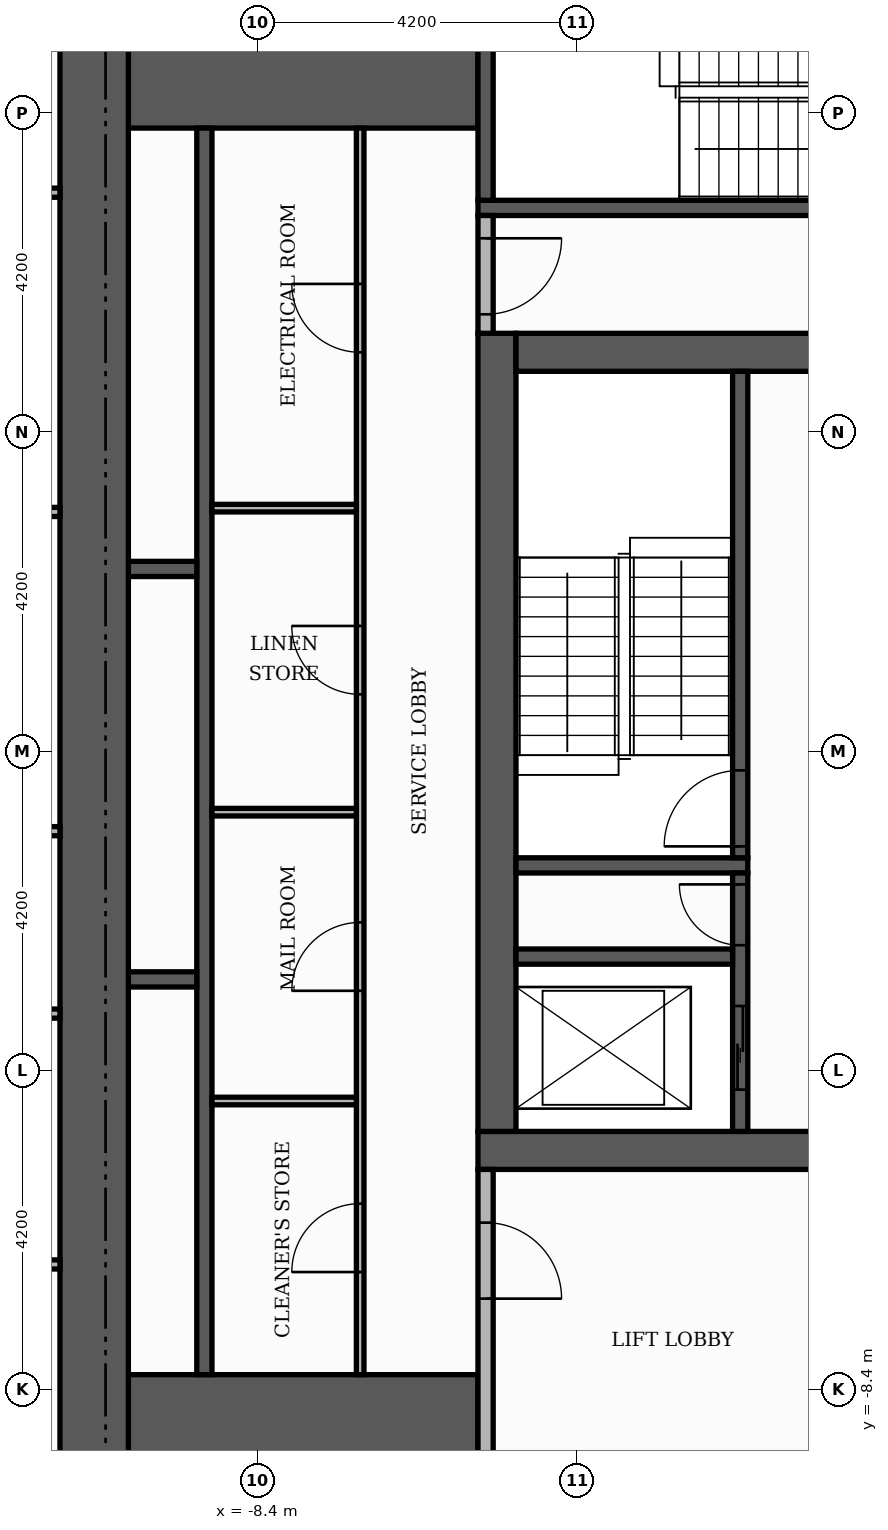
"""IFC4 building model, lengths in metres.
Left out: names, types, materials, properties, quantities, classifications, styles, units other than length and angle.
Written with IfcOpenShell. Run it as: python <this file> out.ifc"""

import sys

from ifc_helpers import new_model, si_unit, direction, frame, frame_2d, origin, place, context, subcontext, project, spatial, rectangle, extrude, element, fill, save


model = new_model("IFC4")
c1 = context("Model", 3, precision=1e-05, world=origin(), true_north=direction((0.0, 1.0)))
c2 = subcontext(c1, "Body", "Model", "MODEL_VIEW")
j1 = project(units=[si_unit("LENGTHUNIT", "METRE"), si_unit("PLANEANGLEUNIT", "RADIAN")], contexts=[c1])
p1 = place(None, origin())
s1 = spatial("IfcSite", under=j1, at=p1, CompositionType="ELEMENT")
p2 = place(p1, origin())
s2 = spatial("IfcBuilding", under=s1, at=p2, CompositionType="ELEMENT")
p3 = place(p2, frame((0.0, 0.0, 260.1)))
s3 = spatial("IfcBuildingStorey", under=s2, at=p3, CompositionType="ELEMENT", Elevation=260.1)
p4 = place(p3, frame((-5.5, -5.25, 0.0), z_axis=(0.0, 0.0, 1.0), x_axis=(1.0, 0.0, 0.0)))
e1 = element("IfcWall", 1, at=p4, inside=s3, PredefinedType="SHEAR", context=c2, shape_type="SweptSolid", body=[
    extrude(rectangle(XDim=11.0, YDim=0.5, at=frame_2d((5.5, 0.0))), origin(), (0.0, 0.0, 1.0), 3.48),
])
p5 = place(p4, frame((4.9, 0.0, 0.0)))
e2 = element("IfcOpeningElement", 2, at=p5, cuts=e1, PredefinedType="OPENING", context=c2, shape_type="SweptSolid", body=[
    extrude(rectangle(XDim=1.2, YDim=2.1, at=frame_2d((0.6, 1.05))), frame((0.0, 0.26, 0.0), z_axis=(0.0, -1.0, 0.0), x_axis=(1.0, 0.0, 0.0)), (0.0, 0.0, 1.0), 0.52),
])
p6 = place(p3, frame((-5.25, -5.0, 0.0), z_axis=(0.0, 0.0, 1.0), x_axis=(0.0, 1.0, 0.0)))
e3 = element("IfcWall", 3, at=p6, inside=s3, PredefinedType="SHEAR", context=c2, shape_type="SweptSolid", body=[
    extrude(rectangle(XDim=10.5, YDim=0.5, at=frame_2d((5.25, 0.0))), origin(), (0.0, 0.0, 1.0), 3.48),
])
p7 = place(p3, frame((-5.0, 5.25, 0.0), z_axis=(0.0, 0.0, 1.0), x_axis=(1.0, 0.0, 0.0)))
e4 = element("IfcWall", 4, at=p7, inside=s3, PredefinedType="SHEAR", context=c2, shape_type="SweptSolid", body=[
    extrude(rectangle(XDim=10.0, YDim=0.5, at=frame_2d((5.0, 0.0))), origin(), (0.0, 0.0, 1.0), 3.48),
])
p8 = place(p7, frame((4.4, 0.0, 0.0)))
e5 = element("IfcOpeningElement", 5, at=p8, cuts=e4, PredefinedType="OPENING", context=c2, shape_type="SweptSolid", body=[
    extrude(rectangle(XDim=1.2, YDim=2.1, at=frame_2d((0.6, 1.05))), frame((0.0, 0.26, 0.0), z_axis=(0.0, -1.0, 0.0), x_axis=(1.0, 0.0, 0.0)), (0.0, 0.0, 1.0), 0.52),
])
for number, where, z_axis, x_axis in (
    (6, (-10.1, -9.15, 0.0), (0.0, 0.0, 1.0), (1.0, 0.0, 0.0)),
    (7, (-10.1, 9.15, 0.0), (0.0, 0.0, 1.0), (1.0, 0.0, 0.0)),
):
    element("IfcWall", number, at=place(p3, frame(where, z_axis=z_axis, x_axis=x_axis)), inside=s3, PredefinedType="SHEAR", context=c2, shape_type="SweptSolid", body=[
        extrude(rectangle(XDim=4.6, YDim=1.9, at=frame_2d((2.3, 0.0))), origin(), (0.0, 0.0, 1.0), 3.48),
    ])
p9 = place(p3, frame((-5.0, -1.5, 0.0), z_axis=(0.0, 0.0, 1.0), x_axis=(1.0, 0.0, 0.0)))
e8 = element("IfcWall", 8, at=p9, inside=s3, PredefinedType="SHEAR", context=c2, shape_type="SweptSolid", body=[
    extrude(rectangle(XDim=3.05, YDim=0.2, at=frame_2d((1.525, 0.0))), origin(), (0.0, 0.0, 1.0), 3.48),
])
p10 = place(p3, frame((-2.05, -1.4, 0.0), z_axis=(0.0, 0.0, 1.0), x_axis=(0.0, 1.0, 0.0)))
e9 = element("IfcWall", 9, at=p10, inside=s3, PredefinedType="SHEAR", context=c2, shape_type="SweptSolid", body=[
    extrude(rectangle(XDim=6.4, YDim=0.2, at=frame_2d((3.2, 0.0))), origin(), (0.0, 0.0, 1.0), 3.48),
])
p11 = place(p10, frame((0.15, 0.0, 0.0)))
e10 = element("IfcOpeningElement", 10, at=p11, cuts=e9, PredefinedType="OPENING", context=c2, shape_type="SweptSolid", body=[
    extrude(rectangle(XDim=1.0, YDim=2.1, at=frame_2d((0.5, 1.05))), frame((0.0, 0.11, 0.0), z_axis=(0.0, -1.0, 0.0), x_axis=(1.0, 0.0, 0.0)), (0.0, 0.0, 1.0), 0.22),
])
p12 = place(p3, frame((-5.5, 7.15, 0.0), z_axis=(0.0, 0.0, 1.0), x_axis=(1.0, 0.0, 0.0)))
e11 = element("IfcWall", 11, at=p12, inside=s3, PredefinedType="SHEAR", context=c2, shape_type="SweptSolid", body=[
    extrude(rectangle(XDim=6.8, YDim=0.2, at=frame_2d((3.4, 0.0))), origin(), (0.0, 0.0, 1.0), 3.48),
])
p13 = place(p3, frame((-5.4, 7.25, 0.0), z_axis=(0.0, 0.0, 1.0), x_axis=(0.0, 1.0, 0.0)))
e12 = element("IfcWall", 12, at=p13, inside=s3, PredefinedType="SHEAR", context=c2, shape_type="SweptSolid", body=[
    extrude(rectangle(XDim=2.85, YDim=0.2, at=frame_2d((1.425, 0.0))), origin(), (0.0, 0.0, 1.0), 3.48),
])
p14 = place(p3, frame((-9.1, -8.2, 0.0), z_axis=(0.0, 0.0, 1.0), x_axis=(0.0, 1.0, 0.0)))
e13 = element("IfcWall", 13, at=p14, inside=s3, PredefinedType="SHEAR", context=c2, shape_type="SweptSolid", body=[
    extrude(rectangle(XDim=16.4, YDim=0.2, at=frame_2d((8.2, 0.0))), origin(), (0.0, 0.0, 1.0), 3.48),
])
p15 = place(p3, frame((-2.05, -5.0, 0.0), z_axis=(0.0, 0.0, 1.0), x_axis=(0.0, 1.0, 0.0)))
e14 = element("IfcWall", 14, at=p15, inside=s3, PredefinedType="SHEAR", context=c2, shape_type="SweptSolid", body=[
    extrude(rectangle(XDim=3.4, YDim=0.2, at=frame_2d((1.7, 0.0))), origin(), (0.0, 0.0, 1.0), 3.48),
])
p16 = place(p15, frame((0.55, 0.0, 0.0)))
e15 = element("IfcOpeningElement", 15, at=p16, cuts=e14, PredefinedType="OPENING", context=c2, shape_type="SweptSolid", body=[
    extrude(rectangle(XDim=1.1, YDim=2.1, at=frame_2d((0.55, 1.05))), frame((0.0, 0.11, 0.0), z_axis=(0.0, -1.0, 0.0), x_axis=(1.0, 0.0, 0.0)), (0.0, 0.0, 1.0), 0.22),
])
p17 = place(p15, frame((2.45, 0.0, 0.0)))
e16 = element("IfcOpeningElement", 16, at=p17, cuts=e14, PredefinedType="OPENING", context=c2, shape_type="SweptSolid", body=[
    extrude(rectangle(XDim=0.8, YDim=2.1, at=frame_2d((0.4, 1.05))), frame((0.0, 0.11, 0.0), z_axis=(0.0, -1.0, 0.0), x_axis=(1.0, 0.0, 0.0)), (0.0, 0.0, 1.0), 0.22),
])
p18 = place(p3, frame((-10.1, -3.0, 0.0), z_axis=(0.0, 0.0, 1.0), x_axis=(1.0, 0.0, 0.0)))
e17 = element("IfcWall", 17, at=p18, inside=s3, PredefinedType="SHEAR", context=c2, shape_type="SweptSolid", body=[
    extrude(rectangle(XDim=0.9, YDim=0.2, at=frame_2d((0.45, 0.0))), origin(), (0.0, 0.0, 1.0), 3.48),
])
p19 = place(p3, frame((-5.0, -2.7, 0.0), z_axis=(0.0, 0.0, 1.0), x_axis=(1.0, 0.0, 0.0)))
e18 = element("IfcWall", 18, at=p19, inside=s3, PredefinedType="SHEAR", context=c2, shape_type="SweptSolid", body=[
    extrude(rectangle(XDim=2.85, YDim=0.2, at=frame_2d((1.425, 0.0))), origin(), (0.0, 0.0, 1.0), 3.48),
])
p20 = place(p3, frame((-10.1, 2.4, 0.0), z_axis=(0.0, 0.0, 1.0), x_axis=(1.0, 0.0, 0.0)))
e19 = element("IfcWall", 19, at=p20, inside=s3, PredefinedType="SHEAR", context=c2, shape_type="SweptSolid", body=[
    extrude(rectangle(XDim=0.9, YDim=0.2, at=frame_2d((0.45, 0.0))), origin(), (0.0, 0.0, 1.0), 3.48),
])
p21 = place(p3, frame((-10.55, -10.1, 0.0), z_axis=(0.0, 0.0, 1.0), x_axis=(0.0, 1.0, 0.0)))
e20 = element("IfcWall", 20, at=p21, inside=s3, PredefinedType="SHEAR", context=c2, shape_type="SweptSolid", body=[
    extrude(rectangle(XDim=20.2, YDim=0.9, at=frame_2d((10.1, 0.0))), origin(), (0.0, 0.0, 1.0), 3.48),
])
p22 = place(p3, frame((-5.4, -10.1, 0.0), z_axis=(0.0, 0.0, 1.0), x_axis=(0.0, 1.0, 0.0)))
e21 = element("IfcWall", 21, at=p22, inside=s3, PredefinedType="PARTITIONING", context=c2, shape_type="SweptSolid", body=[
    extrude(rectangle(XDim=4.6, YDim=0.2, at=frame_2d((2.3, 0.0))), origin(), (0.0, 0.0, 1.0), 3.48),
])
p23 = place(p22, frame((2.9, 0.0, 0.0)))
e22 = element("IfcOpeningElement", 22, at=p23, cuts=e21, PredefinedType="OPENING", context=c2, shape_type="SweptSolid", body=[
    extrude(rectangle(XDim=1.0, YDim=2.1, at=frame_2d((0.5, 1.05))), frame((0.0, 0.11, 0.0), z_axis=(0.0, -1.0, 0.0), x_axis=(1.0, 0.0, 0.0)), (0.0, 0.0, 1.0), 0.22),
])
p24 = place(p3, frame((-7.05, -8.2, 0.0), z_axis=(0.0, 0.0, 1.0), x_axis=(0.0, 1.0, 0.0)))
e23 = element("IfcWall", 23, at=p24, inside=s3, PredefinedType="PARTITIONING", context=c2, shape_type="SweptSolid", body=[
    extrude(rectangle(XDim=16.4, YDim=0.1, at=frame_2d((8.2, 0.0))), origin(), (0.0, 0.0, 1.0), 3.48),
])
p25 = place(p24, frame((1.35, 0.0, 0.0)))
e24 = element("IfcOpeningElement", 24, at=p25, cuts=e23, PredefinedType="OPENING", context=c2, shape_type="SweptSolid", body=[
    extrude(rectangle(XDim=0.9, YDim=2.1, at=frame_2d((0.45, 1.05))), frame((0.0, 0.06, 0.0), z_axis=(0.0, -1.0, 0.0), x_axis=(1.0, 0.0, 0.0)), (0.0, 0.0, 1.0), 0.12),
])
p26 = place(p24, frame((5.05, 0.0, 0.0)))
e25 = element("IfcOpeningElement", 25, at=p26, cuts=e23, PredefinedType="OPENING", context=c2, shape_type="SweptSolid", body=[
    extrude(rectangle(XDim=0.9, YDim=2.1, at=frame_2d((0.45, 1.05))), frame((0.0, 0.06, 0.0), z_axis=(0.0, -1.0, 0.0), x_axis=(1.0, 0.0, 0.0)), (0.0, 0.0, 1.0), 0.12),
])
p27 = place(p24, frame((8.95, 0.0, 0.0)))
e26 = element("IfcOpeningElement", 26, at=p27, cuts=e23, PredefinedType="OPENING", context=c2, shape_type="SweptSolid", body=[
    extrude(rectangle(XDim=0.9, YDim=2.1, at=frame_2d((0.45, 1.05))), frame((0.0, 0.06, 0.0), z_axis=(0.0, -1.0, 0.0), x_axis=(1.0, 0.0, 0.0)), (0.0, 0.0, 1.0), 0.12),
])
p28 = place(p24, frame((13.45, 0.0, 0.0)))
e27 = element("IfcOpeningElement", 27, at=p28, cuts=e23, PredefinedType="OPENING", context=c2, shape_type="SweptSolid", body=[
    extrude(rectangle(XDim=0.9, YDim=2.1, at=frame_2d((0.45, 1.05))), frame((0.0, 0.06, 0.0), z_axis=(0.0, -1.0, 0.0), x_axis=(1.0, 0.0, 0.0)), (0.0, 0.0, 1.0), 0.12),
])
for number, where, z_axis, x_axis in (
    (28, (-9.0, -4.6, 0.0), (0.0, 0.0, 1.0), (1.0, 0.0, 0.0)),
    (29, (-9.0, -0.8, 0.0), (0.0, 0.0, 1.0), (1.0, 0.0, 0.0)),
    (30, (-9.0, 3.2, 0.0), (0.0, 0.0, 1.0), (1.0, 0.0, 0.0)),
):
    element("IfcWall", number, at=place(p3, frame(where, z_axis=z_axis, x_axis=x_axis)), inside=s3, PredefinedType="PARTITIONING", context=c2, shape_type="SweptSolid", body=[
        extrude(rectangle(XDim=1.9, YDim=0.1, at=frame_2d((0.95, 0.0))), origin(), (0.0, 0.0, 1.0), 3.48),
    ])
p29 = place(p3, frame((-5.4, 5.5, 0.0), z_axis=(0.0, 0.0, 1.0), x_axis=(0.0, 1.0, 0.0)))
e31 = element("IfcWall", 31, at=p29, inside=s3, PredefinedType="PARTITIONING", context=c2, shape_type="SweptSolid", body=[
    extrude(rectangle(XDim=1.55, YDim=0.2, at=frame_2d((0.775, 0.0))), origin(), (0.0, 0.0, 1.0), 3.48),
])
p30 = place(p29, frame((0.25, 0.0, 0.0)))
e32 = element("IfcOpeningElement", 32, at=p30, cuts=e31, PredefinedType="OPENING", context=c2, shape_type="SweptSolid", body=[
    extrude(rectangle(XDim=1.0, YDim=2.1, at=frame_2d((0.5, 1.05))), frame((0.0, 0.11, 0.0), z_axis=(0.0, -1.0, 0.0), x_axis=(1.0, 0.0, 0.0)), (0.0, 0.0, 1.0), 0.22),
])
for number, where, z_axis, x_axis in (
    (33, (-19.22, -6.75, 0.0), (0.0, 0.0, 1.0), (1.0, 0.0, 0.0)),
    (34, (-19.22, -3.45, 0.0), (0.0, 0.0, 1.0), (1.0, 0.0, 0.0)),
    (35, (-19.22, -1.05, 0.0), (0.0, 0.0, 1.0), (1.0, 0.0, 0.0)),
    (36, (-19.22, 3.15, 0.0), (0.0, 0.0, 1.0), (1.0, 0.0, 0.0)),
):
    element("IfcWall", number, at=place(p3, frame(where, z_axis=z_axis, x_axis=x_axis)), inside=s3, PredefinedType="PARTITIONING", context=c2, shape_type="SweptSolid", body=[
        extrude(rectangle(XDim=8.22, YDim=0.12, at=frame_2d((4.11, 0.0))), origin(), (0.0, 0.0, 1.0), 3.48),
    ])
p31 = place(p3, frame((-19.22, 7.35, 0.0), z_axis=(0.0, 0.0, 1.0), x_axis=(1.0, 0.0, 0.0)))
e37 = element("IfcWall", 37, at=p31, inside=s3, PredefinedType="PARTITIONING", context=c2, shape_type="SweptSolid", body=[
    extrude(rectangle(XDim=8.22, YDim=0.12, at=frame_2d((4.11, 0.0))), origin(), (0.0, 0.0, 1.0), 3.48),
])
p32 = place(p31, frame((3.66, 0.0, 0.0)))
e38 = element("IfcOpeningElement", 38, at=p32, cuts=e37, PredefinedType="OPENING", context=c2, shape_type="SweptSolid", body=[
    extrude(rectangle(XDim=0.9, YDim=2.1, at=frame_2d((0.45, 1.05))), frame((0.0, 0.07, 0.0), z_axis=(0.0, -1.0, 0.0), x_axis=(1.0, 0.0, 0.0)), (0.0, 0.0, 1.0), 0.14),
])
p33 = place(p16, origin())
e39 = element("IfcDoor", 39, at=p33, inside=s3, OperationType="SLIDING_TO_LEFT", PredefinedType="DOOR", context=c2, shape_type="SweptSolid", body=[
    extrude(rectangle(XDim=1.1, YDim=2.1, at=frame_2d((0.55, 1.05))), frame((0.0, 0.025, 0.0), z_axis=(0.0, -1.0, 0.0), x_axis=(1.0, 0.0, 0.0)), (0.0, 0.0, 1.0), 0.05),
])
fill(e15, e39)
p34 = place(p11, origin())
e40 = element("IfcDoor", 40, at=p34, inside=s3, OperationType="SINGLE_SWING_LEFT", PredefinedType="DOOR", context=c2, shape_type="SweptSolid", body=[
    extrude(rectangle(XDim=1.0, YDim=2.1, at=frame_2d((0.5, 1.05))), frame((0.0, 0.025, 0.0), z_axis=(0.0, -1.0, 0.0), x_axis=(1.0, 0.0, 0.0)), (0.0, 0.0, 1.0), 0.05),
])
fill(e10, e40)
p35 = place(p17, origin())
e41 = element("IfcDoor", 41, at=p35, inside=s3, OperationType="SINGLE_SWING_RIGHT", PredefinedType="DOOR", context=c2, shape_type="SweptSolid", body=[
    extrude(rectangle(XDim=0.8, YDim=2.1, at=frame_2d((0.4, 1.05))), frame((0.0, 0.025, 0.0), z_axis=(0.0, -1.0, 0.0), x_axis=(1.0, 0.0, 0.0)), (0.0, 0.0, 1.0), 0.05),
])
fill(e16, e41)
p36 = place(p30, frame((1.0, 0.0, 0.0), z_axis=(0.0, 0.0, 1.0), x_axis=(-1.0, 0.0, 0.0)))
e42 = element("IfcDoor", 42, at=p36, inside=s3, OperationType="SINGLE_SWING_RIGHT", PredefinedType="DOOR", context=c2, shape_type="SweptSolid", body=[
    extrude(rectangle(XDim=1.0, YDim=2.1, at=frame_2d((0.5, 1.05))), frame((0.0, 0.025, 0.0), z_axis=(0.0, -1.0, 0.0), x_axis=(1.0, 0.0, 0.0)), (0.0, 0.0, 1.0), 0.05),
])
fill(e32, e42)
p37 = place(p23, frame((1.0, 0.0, 0.0), z_axis=(0.0, 0.0, 1.0), x_axis=(-1.0, 0.0, 0.0)))
e43 = element("IfcDoor", 43, at=p37, inside=s3, OperationType="SINGLE_SWING_LEFT", PredefinedType="DOOR", context=c2, shape_type="SweptSolid", body=[
    extrude(rectangle(XDim=1.0, YDim=2.1, at=frame_2d((0.5, 1.05))), frame((0.0, 0.025, 0.0), z_axis=(0.0, -1.0, 0.0), x_axis=(1.0, 0.0, 0.0)), (0.0, 0.0, 1.0), 0.05),
])
fill(e22, e43)
p38 = place(p25, origin())
e44 = element("IfcDoor", 44, at=p38, inside=s3, OperationType="SINGLE_SWING_LEFT", PredefinedType="DOOR", context=c2, shape_type="SweptSolid", body=[
    extrude(rectangle(XDim=0.9, YDim=2.1, at=frame_2d((0.45, 1.05))), frame((0.0, 0.025, 0.0), z_axis=(0.0, -1.0, 0.0), x_axis=(1.0, 0.0, 0.0)), (0.0, 0.0, 1.0), 0.05),
])
fill(e24, e44)
p39 = place(p26, origin())
e45 = element("IfcDoor", 45, at=p39, inside=s3, OperationType="SINGLE_SWING_LEFT", PredefinedType="DOOR", context=c2, shape_type="SweptSolid", body=[
    extrude(rectangle(XDim=0.9, YDim=2.1, at=frame_2d((0.45, 1.05))), frame((0.0, 0.025, 0.0), z_axis=(0.0, -1.0, 0.0), x_axis=(1.0, 0.0, 0.0)), (0.0, 0.0, 1.0), 0.05),
])
fill(e25, e45)
p40 = place(p27, origin())
e46 = element("IfcDoor", 46, at=p40, inside=s3, OperationType="SINGLE_SWING_RIGHT", PredefinedType="DOOR", context=c2, shape_type="SweptSolid", body=[
    extrude(rectangle(XDim=0.9, YDim=2.1, at=frame_2d((0.45, 1.05))), frame((0.0, 0.025, 0.0), z_axis=(0.0, -1.0, 0.0), x_axis=(1.0, 0.0, 0.0)), (0.0, 0.0, 1.0), 0.05),
])
fill(e26, e46)
p41 = place(p28, origin())
e47 = element("IfcDoor", 47, at=p41, inside=s3, OperationType="SINGLE_SWING_RIGHT", PredefinedType="DOOR", context=c2, shape_type="SweptSolid", body=[
    extrude(rectangle(XDim=0.9, YDim=2.1, at=frame_2d((0.45, 1.05))), frame((0.0, 0.025, 0.0), z_axis=(0.0, -1.0, 0.0), x_axis=(1.0, 0.0, 0.0)), (0.0, 0.0, 1.0), 0.05),
])
fill(e27, e47)
save(model, sys.argv[1])
